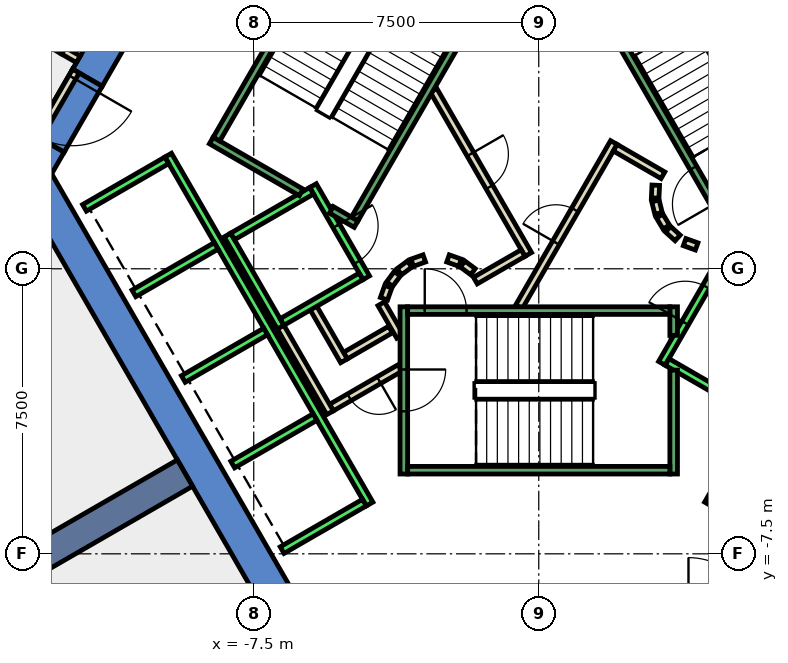
"""IFC4 building model, lengths in metres.
Left out: names, types, materials, properties, quantities, classifications, styles, units other than length and angle.
Written with IfcOpenShell. Run it as: python <this file> out.ifc"""

import sys

from ifc_helpers import new_model, si_unit, direction, frame, frame_2d, origin, place, context, subcontext, project, spatial, polyline, rectangle, outline, extrude, element, fill, save


model = new_model("IFC4")
c1 = context("Model", 3, precision=1e-05, world=origin(), true_north=direction((0.0, 1.0)))
c2 = subcontext(c1, "Body", "Model", "MODEL_VIEW")
j1 = project(units=[si_unit("LENGTHUNIT", "METRE"), si_unit("PLANEANGLEUNIT", "RADIAN")], contexts=[c1])
p1 = place(None, origin())
s1 = spatial("IfcSite", under=j1, at=p1, CompositionType="ELEMENT")
p2 = place(p1, origin())
s2 = spatial("IfcBuilding", under=s1, at=p2, CompositionType="ELEMENT")
p3 = place(p2, frame((0.0, 0.0, 120.2)))
s3 = spatial("IfcBuildingStorey", under=s2, at=p3, CompositionType="ELEMENT", Elevation=120.2)
p4 = place(p3, frame((0.0, 0.0, -0.4)))
e1 = element("IfcWall", 1, at=p4, inside=s3, PredefinedType="SHEAR", context=c2, shape_type="SweptSolid", body=[
    extrude(outline(polyline([(-12.267, 5.252), (-11.488, 4.802), (-6.409, 13.6), (-6.928, 14.5), (-12.267, 5.252)])), origin(), (0.0, 0.0, 1.0), 4.2),
])
p5 = place(p3, frame((0.0, 0.0, -0.4)))
e2 = element("IfcWall", 2, at=p5, inside=s3, PredefinedType="SHEAR", context=c2, shape_type="SweptSolid", body=[
    extrude(outline(polyline([(-12.488, 3.07), (-13.267, 3.52), (-13.856, 2.5), (-12.817, 2.5), (-12.488, 3.07)])), origin(), (0.0, 0.0, 1.0), 4.2),
])
p6 = place(p3, frame((0.0, 0.0, 3.6)))
e3 = element("IfcWall", 3, at=p6, inside=s3, PredefinedType="SHEAR", context=c2, shape_type="SweptSolid", body=[
    extrude(outline(polyline([(-13.267, 3.52), (-12.488, 3.07), (-11.488, 4.802), (-12.267, 5.252), (-13.267, 3.52)])), origin(), (0.0, 0.0, 1.0), 0.2),
])
p7 = place(p3, frame((0.0, 0.0, -0.4)))
e4 = element("IfcWall", 4, at=p7, inside=s3, PredefinedType="SHEAR", context=c2, shape_type="SweptSolid", body=[
    extrude(outline(polyline([(-13.856, 2.5), (-6.928, -9.5), (-6.409, -8.6), (-12.817, 2.5), (-13.856, 2.5)])), origin(), (0.0, 0.0, 1.0), 4.2),
])
p8 = place(p3, frame((-9.31, -5.375, -0.4), z_axis=(0.0, 0.0, 1.0), x_axis=(-0.866017533419, -0.500013631625, 0.0)))
e5 = element("IfcWall", 5, at=p8, inside=s3, PredefinedType="SHEAR", context=c2, shape_type="SweptSolid", body=[
    extrude(rectangle(XDim=9.0, YDim=0.8, at=frame_2d((4.5, 0.0))), origin(), (0.0, 0.0, 1.0), 4.2),
])
p9 = place(p3, frame((-15.532, 7.484, 0.0), z_axis=(0.0, 0.0, 1.0), x_axis=(0.866045954906, -0.499964402723, 0.0)))
e6 = element("IfcWall", 6, at=p9, inside=s3, PredefinedType="PARTITIONING", context=c2, shape_type="SweptSolid", body=[
    extrude(rectangle(XDim=3.494, YDim=0.2, at=frame_2d((1.747, 0.0))), origin(), (0.0, 0.0, 1.0), 3.8),
])
p10 = place(p3, frame((-3.9, -1.599, 0.0), z_axis=(0.0, 0.0, 1.0), x_axis=(-0.865969445389, -0.500096910261, 0.0)))
e7 = element("IfcWall", 7, at=p10, inside=s3, PredefinedType="PARTITIONING", context=c2, shape_type="SweptSolid", body=[
    extrude(rectangle(XDim=1.373, YDim=0.2, at=frame_2d((0.687, 0.0))), origin(), (0.0, 0.0, 1.0), 3.8),
])
p11 = place(p3, frame((-5.126, -2.422, 0.0), z_axis=(0.0, 0.0, 1.0), x_axis=(-0.500062241894, 0.865989465428, 0.0)))
e8 = element("IfcWall", 8, at=p11, inside=s3, PredefinedType="PARTITIONING", context=c2, shape_type="SweptSolid", body=[
    extrude(rectangle(XDim=1.7, YDim=0.2, at=frame_2d((0.85, 0.0))), origin(), (0.0, 0.0, 1.0), 3.8),
])
p12 = place(p3, frame((-3.65, -2.61, 0.0), z_axis=(0.0, 0.0, 1.0), x_axis=(-0.866072462134, -0.499918483688, 0.0)))
e9 = element("IfcWall", 9, at=p12, inside=s3, PredefinedType="PARTITIONING", context=c2, shape_type="SweptSolid", body=[
    extrude(rectangle(XDim=2.084, YDim=0.2, at=frame_2d((1.042, 0.0))), origin(), (0.0, 0.0, 1.0), 3.8),
])
p13 = place(p12, frame((0.642, 0.0, 0.0)))
e10 = element("IfcOpeningElement", 10, at=p13, cuts=e9, PredefinedType="OPENING", context=c2, shape_type="SweptSolid", body=[
    extrude(rectangle(XDim=0.9, YDim=2.1, at=frame_2d((0.45, 1.05))), frame((0.0, 0.11, 0.0), z_axis=(0.0, -1.0, 0.0), x_axis=(1.0, 0.0, 0.0)), (0.0, 0.0, 1.0), 0.22),
])
p14 = place(p3, frame((-5.492, -3.788, 0.0), z_axis=(0.0, 0.0, 1.0), x_axis=(-0.500008949224, 0.866020236886, 0.0)))
e11 = element("IfcWall", 11, at=p14, inside=s3, PredefinedType="PARTITIONING", context=c2, shape_type="SweptSolid", body=[
    extrude(rectangle(XDim=2.68, YDim=0.2, at=frame_2d((1.34, 0.0))), origin(), (0.0, 0.0, 1.0), 3.8),
])
p15 = place(p3, frame((-4.145, -0.92, 0.0), z_axis=(0.0, 0.0, 1.0), x_axis=(0.499743786207, -0.866173278362, 0.0)))
e12 = element("IfcWall", 12, at=p15, inside=s3, PredefinedType="PARTITIONING", context=c2, shape_type="SweptSolid", body=[
    extrude(rectangle(XDim=0.991, YDim=0.2, at=frame_2d((0.495, 0.0))), origin(), (0.0, 0.0, 1.0), 3.8),
])
p16 = place(p3, frame((-0.52, -1.0, 0.0), z_axis=(0.0, 0.0, 1.0), x_axis=(0.50011622646, 0.865958290007, 0.0)))
e13 = element("IfcWall", 13, at=p16, inside=s3, PredefinedType="PARTITIONING", context=c2, shape_type="SweptSolid", body=[
    extrude(rectangle(XDim=4.991, YDim=0.2, at=frame_2d((2.496, 0.0))), origin(), (0.0, 0.0, 1.0), 3.8),
])
p17 = place(p16, frame((1.945, 0.0, 0.0)))
e14 = element("IfcOpeningElement", 14, at=p17, cuts=e13, PredefinedType="OPENING", context=c2, shape_type="SweptSolid", body=[
    extrude(rectangle(XDim=1.0, YDim=2.1, at=frame_2d((0.5, 1.05))), frame((0.0, 0.11, 0.0), z_axis=(0.0, -1.0, 0.0), x_axis=(1.0, 0.0, 0.0)), (0.0, 0.0, 1.0), 0.22),
])
p18 = place(p3, frame((2.012, 3.186, 0.0), z_axis=(0.0, 0.0, 1.0), x_axis=(0.865891012941, -0.500232699559, 0.0)))
e15 = element("IfcWall", 15, at=p18, inside=s3, PredefinedType="PARTITIONING", context=c2, shape_type="SweptSolid", body=[
    extrude(rectangle(XDim=1.449, YDim=0.2, at=frame_2d((0.725, 0.0))), origin(), (0.0, 0.0, 1.0), 3.8),
])
p19 = place(p3, frame((3.079, 2.199, 0.0), z_axis=(0.0, 0.0, 1.0), x_axis=(-0.047771483479, -0.998858290933, 0.0)))
e16 = element("IfcWall", 16, at=p19, inside=s3, PredefinedType="PARTITIONING", context=c2, shape_type="SweptSolid", body=[
    extrude(rectangle(XDim=0.337, YDim=0.2, at=frame_2d((0.169, 0.0))), origin(), (0.0, 0.0, 1.0), 3.8),
])
p20 = place(p3, frame((3.07, 1.786, 0.0), z_axis=(0.0, 0.0, 1.0), x_axis=(0.242705583207, -0.970099994784, 0.0)))
e17 = element("IfcWall", 17, at=p20, inside=s3, PredefinedType="PARTITIONING", context=c2, shape_type="SweptSolid", body=[
    extrude(rectangle(XDim=0.338, YDim=0.2, at=frame_2d((0.169, 0.0))), origin(), (0.0, 0.0, 1.0), 3.8),
])
for number, where, z_axis, x_axis in (
    (18, (3.182, 1.388, 0.0), (0.0, 0.0, 1.0), (0.512, -0.859, 0.0)),
    (19, (3.404, 1.039, 0.0), (0.0, 0.0, 1.0), (0.74, -0.672, 0.0)),
):
    element("IfcWall", number, at=place(p3, frame(where, z_axis=z_axis, x_axis=x_axis)), inside=s3, PredefinedType="PARTITIONING", context=c2, shape_type="SweptSolid", body=[
        extrude(rectangle(XDim=0.338, YDim=0.2, at=frame_2d((0.169, 0.0))), origin(), (0.0, 0.0, 1.0), 3.8),
    ])
p21 = place(p3, frame((3.838, 0.702, 0.0), z_axis=(0.0, 0.0, 1.0), x_axis=(0.941035081519, -0.338308993895, 0.0)))
e20 = element("IfcWall", 20, at=p21, inside=s3, PredefinedType="PARTITIONING", context=c2, shape_type="SweptSolid", body=[
    extrude(rectangle(XDim=0.337, YDim=0.2, at=frame_2d((0.168, 0.0))), origin(), (0.0, 0.0, 1.0), 3.8),
])
p22 = place(p3, frame((-2.771, 4.7, 0.0), z_axis=(0.0, 0.0, 1.0), x_axis=(0.499969479948, -0.866043023828, 0.0)))
e21 = element("IfcWall", 21, at=p22, inside=s3, PredefinedType="PARTITIONING", context=c2, shape_type="SweptSolid", body=[
    extrude(rectangle(XDim=4.99, YDim=0.2, at=frame_2d((2.495, 0.0))), origin(), (0.0, 0.0, 1.0), 3.8),
])
p23 = place(p22, frame((1.945, 0.0, 0.0)))
e22 = element("IfcOpeningElement", 22, at=p23, cuts=e21, PredefinedType="OPENING", context=c2, shape_type="SweptSolid", body=[
    extrude(rectangle(XDim=1.0, YDim=2.1, at=frame_2d((0.5, 1.05))), frame((0.0, 0.11, 0.0), z_axis=(0.0, -1.0, 0.0), x_axis=(1.0, 0.0, 0.0)), (0.0, 0.0, 1.0), 0.22),
])
p24 = place(p3, frame((-0.412, 0.414, 0.0), z_axis=(0.0, 0.0, 1.0), x_axis=(-0.866017369001, -0.500013916395, 0.0)))
e23 = element("IfcWall", 23, at=p24, inside=s3, PredefinedType="PARTITIONING", context=c2, shape_type="SweptSolid", body=[
    extrude(rectangle(XDim=1.45, YDim=0.2, at=frame_2d((0.725, 0.0))), origin(), (0.0, 0.0, 1.0), 3.8),
])
p25 = place(p3, frame((-1.731, -0.077, 0.0), z_axis=(0.0, 0.0, 1.0), x_axis=(-0.804311165252, 0.594208338422, 0.0)))
e24 = element("IfcWall", 24, at=p25, inside=s3, PredefinedType="PARTITIONING", context=c2, shape_type="SweptSolid", body=[
    extrude(rectangle(XDim=0.338, YDim=0.2, at=frame_2d((0.169, 0.0))), origin(), (0.0, 0.0, 1.0), 3.8),
])
p26 = place(p3, frame((-2.07, 0.16, 0.0), z_axis=(0.0, 0.0, 1.0), x_axis=(-0.942199461132, 0.335052496547, 0.0)))
e25 = element("IfcWall", 25, at=p26, inside=s3, PredefinedType="PARTITIONING", context=c2, shape_type="SweptSolid", body=[
    extrude(rectangle(XDim=0.337, YDim=0.2, at=frame_2d((0.169, 0.0))), origin(), (0.0, 0.0, 1.0), 3.8),
])
p27 = place(p3, frame((-3.012, 0.273, 0.0), z_axis=(0.0, 0.0, 1.0), x_axis=(-0.942280615813, -0.334824194261, 0.0)))
e26 = element("IfcWall", 26, at=p27, inside=s3, PredefinedType="PARTITIONING", context=c2, shape_type="SweptSolid", body=[
    extrude(rectangle(XDim=0.338, YDim=0.2, at=frame_2d((0.169, 0.0))), origin(), (0.0, 0.0, 1.0), 3.8),
])
p28 = place(p3, frame((-3.397, 0.124, 0.0), z_axis=(0.0, 0.0, 1.0), x_axis=(-0.804311165252, -0.594208338422, 0.0)))
e27 = element("IfcWall", 27, at=p28, inside=s3, PredefinedType="PARTITIONING", context=c2, shape_type="SweptSolid", body=[
    extrude(rectangle(XDim=0.338, YDim=0.2, at=frame_2d((0.169, 0.0))), origin(), (0.0, 0.0, 1.0), 3.8),
])
p29 = place(p3, frame((-3.723, -0.131, 0.0), z_axis=(0.0, 0.0, 1.0), x_axis=(-0.594675113454, -0.803966112121, 0.0)))
e28 = element("IfcWall", 28, at=p29, inside=s3, PredefinedType="PARTITIONING", context=c2, shape_type="SweptSolid", body=[
    extrude(rectangle(XDim=0.338, YDim=0.2, at=frame_2d((0.169, 0.0))), origin(), (0.0, 0.0, 1.0), 3.8),
])
p30 = place(p3, frame((-3.96, -0.47, 0.0), z_axis=(0.0, 0.0, 1.0), x_axis=(-0.334824194261, -0.942280615813, 0.0)))
e29 = element("IfcWall", 29, at=p30, inside=s3, PredefinedType="PARTITIONING", context=c2, shape_type="SweptSolid", body=[
    extrude(rectangle(XDim=0.338, YDim=0.2, at=frame_2d((0.169, 0.0))), origin(), (0.0, 0.0, 1.0), 3.8),
])
p31 = place(p3, frame((-12.18, 5.202, 0.0), z_axis=(0.0, 0.0, 1.0), x_axis=(-0.50002537861, -0.866010750942, 0.0)))
e30 = element("IfcWall", 30, at=p31, inside=s3, PredefinedType="PARTITIONING", context=c2, shape_type="SweptSolid", body=[
    extrude(rectangle(XDim=2.0, YDim=0.2, at=frame_2d((1.0, 0.0))), origin(), (0.0, 0.0, 1.0), 2.4),
])
p32 = place(p31, frame((0.19, 0.0, 0.0)))
e31 = element("IfcOpeningElement", 31, at=p32, cuts=e30, PredefinedType="OPENING", context=c2, shape_type="SweptSolid", body=[
    extrude(rectangle(XDim=1.8, YDim=2.1, at=frame_2d((0.9, 1.05))), frame((0.0, 0.11, 0.0), z_axis=(0.0, -1.0, 0.0), x_axis=(1.0, 0.0, 0.0)), (0.0, 0.0, 1.0), 0.22),
])
p33 = place(p3, frame((-12.506, 5.737, 0.0), z_axis=(0.0, 0.0, 1.0), x_axis=(0.865624510465, -0.500693725627, 0.0)))
e32 = element("IfcWall", 32, at=p33, inside=s3, PredefinedType="PARTITIONING", context=c2, shape_type="SweptSolid", body=[
    extrude(rectangle(XDim=0.449, YDim=0.2, at=frame_2d((0.225, 0.0))), origin(), (0.0, 0.0, 1.0), 2.4),
])
p34 = place(p3, frame((-5.94, 2.188, 0.0), z_axis=(0.0, 0.0, 1.0), x_axis=(0.49994636267, -0.866056369097, 0.0)))
e33 = element("IfcWall", 33, at=p34, inside=s3, PredefinedType="STANDARD", context=c2, shape_type="SweptSolid", body=[
    extrude(rectangle(XDim=2.8, YDim=0.2, at=frame_2d((1.4, 0.0))), origin(), (0.0, 0.0, 1.0), 3.8),
])
p35 = place(p34, frame((1.225, 0.0, 0.0)))
e34 = element("IfcOpeningElement", 34, at=p35, cuts=e33, PredefinedType="OPENING", context=c2, shape_type="SweptSolid", body=[
    extrude(rectangle(XDim=1.1, YDim=2.1, at=frame_2d((0.55, 1.05))), frame((0.0, 0.11, 0.0), z_axis=(0.0, -1.0, 0.0), x_axis=(1.0, 0.0, 0.0)), (0.0, 0.0, 1.0), 0.22),
])
p36 = place(p3, frame((-8.192, 0.888, 0.0), z_axis=(0.0, 0.0, 1.0), x_axis=(0.49994636267, -0.866056369097, 0.0)))
e35 = element("IfcWall", 35, at=p36, inside=s3, PredefinedType="STANDARD", context=c2, shape_type="SweptSolid", body=[
    extrude(rectangle(XDim=2.8, YDim=0.2, at=frame_2d((1.4, 0.0))), origin(), (0.0, 0.0, 1.0), 3.8),
])
for number, where, z_axis, x_axis in (
    (36, (-5.977, 2.052, 0.0), (0.0, 0.0, 1.0), (-0.866, -0.5, 0.0)),
    (37, (-4.677, -0.2, 0.0), (0.0, 0.0, 1.0), (-0.866, -0.5, 0.0)),
):
    element("IfcWall", number, at=place(p3, frame(where, z_axis=z_axis, x_axis=x_axis)), inside=s3, PredefinedType="STANDARD", context=c2, shape_type="SweptSolid", body=[
        extrude(rectangle(XDim=2.399, YDim=0.2, at=frame_2d((1.2, 0.0))), origin(), (0.0, 0.0, 1.0), 3.8),
    ])
p37 = place(p3, frame((-9.751, 2.99, 0.0), z_axis=(0.0, 0.0, 1.0), x_axis=(0.50000090737, -0.866024879913, 0.0)))
e38 = element("IfcWall", 38, at=p37, inside=s3, PredefinedType="STANDARD", context=c2, shape_type="SweptSolid", body=[
    extrude(rectangle(XDim=10.6, YDim=0.2, at=frame_2d((5.3, 0.0))), origin(), (0.0, 0.0, 1.0), 3.8),
])
p38 = place(p3, frame((-9.788, 2.853, 0.0), z_axis=(0.0, 0.0, 1.0), x_axis=(-0.865998541277, -0.500046524342, 0.0)))
e39 = element("IfcWall", 39, at=p38, inside=s3, PredefinedType="STANDARD", context=c2, shape_type="SweptSolid", body=[
    extrude(rectangle(XDim=2.5, YDim=0.2, at=frame_2d((1.25, 0.0))), origin(), (0.0, 0.0, 1.0), 3.8),
])
for number, where, z_axis, x_axis in (
    (40, (-8.488, 0.602, 0.0), (0.0, 0.0, 1.0), (-0.866, -0.5, 0.0)),
    (41, (-7.188, -1.65, 0.0), (0.0, 0.0, 1.0), (-0.866, -0.5, 0.0)),
    (42, (-5.888, -3.902, 0.0), (0.0, 0.0, 1.0), (-0.866, -0.5, 0.0)),
    (43, (-4.588, -6.153, 0.0), (0.0, 0.0, 1.0), (-0.866, -0.5, 0.0)),
):
    element("IfcWall", number, at=place(p3, frame(where, z_axis=z_axis, x_axis=x_axis)), inside=s3, PredefinedType="STANDARD", context=c2, shape_type="SweptSolid", body=[
        extrude(rectangle(XDim=2.5, YDim=0.2, at=frame_2d((1.25, 0.0))), origin(), (0.0, 0.0, 1.0), 3.8),
    ])
p39 = place(p3, frame((3.24, -2.488, 0.0), z_axis=(0.0, 0.0, 1.0), x_axis=(0.49994636267, 0.866056369097, 0.0)))
e44 = element("IfcWall", 44, at=p39, inside=s3, PredefinedType="STANDARD", context=c2, shape_type="SweptSolid", body=[
    extrude(rectangle(XDim=2.8, YDim=0.2, at=frame_2d((1.4, 0.0))), origin(), (0.0, 0.0, 1.0), 3.8),
])
p40 = place(p39, frame((1.225, 0.0, 0.0)))
e45 = element("IfcOpeningElement", 45, at=p40, cuts=e44, PredefinedType="OPENING", context=c2, shape_type="SweptSolid", body=[
    extrude(rectangle(XDim=1.1, YDim=2.1, at=frame_2d((0.55, 1.05))), frame((0.0, 0.11, 0.0), z_axis=(0.0, -1.0, 0.0), x_axis=(1.0, 0.0, 0.0)), (0.0, 0.0, 1.0), 0.22),
])
p41 = place(p3, frame((3.377, -2.452, 0.0), z_axis=(0.0, 0.0, 1.0), x_axis=(0.865955154139, -0.50012165622, 0.0)))
e46 = element("IfcWall", 46, at=p41, inside=s3, PredefinedType="STANDARD", context=c2, shape_type="SweptSolid", body=[
    extrude(rectangle(XDim=2.4, YDim=0.2, at=frame_2d((1.2, 0.0))), origin(), (0.0, 0.0, 1.0), 3.8),
])
p42 = place(p3, frame((4.451, -6.19, 0.0), z_axis=(0.0, 0.0, 1.0), x_axis=(0.50000090737, 0.866024879913, 0.0)))
e47 = element("IfcWall", 47, at=p42, inside=s3, PredefinedType="STANDARD", context=c2, shape_type="SweptSolid", body=[
    extrude(rectangle(XDim=10.6, YDim=0.2, at=frame_2d((5.3, 0.0))), origin(), (0.0, 0.0, 1.0), 3.8),
])
p43 = place(p3, frame((-3.55, -1.0, 0.0), z_axis=(0.0, 0.0, 1.0), x_axis=(0.0, -1.0, 0.0)))
e48 = element("IfcWall", 48, at=p43, inside=s3, PredefinedType="STANDARD", context=c2, shape_type="SweptSolid", body=[
    extrude(rectangle(XDim=4.4, YDim=0.2, at=frame_2d((2.2, 0.0))), origin(), (0.0, 0.0, 1.0), 3.8),
])
p44 = place(p43, frame((1.65, 0.0, 0.0)))
e49 = element("IfcOpeningElement", 49, at=p44, cuts=e48, PredefinedType="OPENING", context=c2, shape_type="SweptSolid", body=[
    extrude(rectangle(XDim=1.1, YDim=2.2, at=frame_2d((0.55, 1.1))), frame((0.0, 0.11, 0.0), z_axis=(0.0, -1.0, 0.0), x_axis=(1.0, 0.0, 0.0)), (0.0, 0.0, 1.0), 0.22),
])
p45 = place(p3, frame((3.55, -2.667, 0.0), z_axis=(0.0, 0.0, 1.0), x_axis=(0.0, -1.0, 0.0)))
e50 = element("IfcWall", 50, at=p45, inside=s3, PredefinedType="STANDARD", context=c2, shape_type="SweptSolid", body=[
    extrude(rectangle(XDim=2.733, YDim=0.2, at=frame_2d((1.366, 0.0))), origin(), (0.0, 0.0, 1.0), 3.8),
])
p46 = place(p3, frame((3.55, -1.0, 0.0), z_axis=(0.0, 0.0, 1.0), x_axis=(0.0, -1.0, 0.0)))
e51 = element("IfcWall", 51, at=p46, inside=s3, PredefinedType="STANDARD", context=c2, shape_type="SweptSolid", body=[
    extrude(rectangle(XDim=0.751, YDim=0.2, at=frame_2d((0.375, 0.0))), origin(), (0.0, 0.0, 1.0), 3.8),
])
p47 = place(p3, frame((-3.45, -1.1, 0.0), z_axis=(0.0, 0.0, 1.0), x_axis=(1.0, 0.0, 0.0)))
e52 = element("IfcWall", 52, at=p47, inside=s3, PredefinedType="STANDARD", context=c2, shape_type="SweptSolid", body=[
    extrude(rectangle(XDim=6.9, YDim=0.2, at=frame_2d((3.45, 0.0))), origin(), (0.0, 0.0, 1.0), 3.8),
])
p48 = place(p47, frame((0.45, 0.0, 0.0)))
e53 = element("IfcOpeningElement", 53, at=p48, cuts=e52, PredefinedType="OPENING", context=c2, shape_type="SweptSolid", body=[
    extrude(rectangle(XDim=1.1, YDim=2.2, at=frame_2d((0.55, 1.1))), frame((0.0, 0.11, 0.0), z_axis=(0.0, -1.0, 0.0), x_axis=(1.0, 0.0, 0.0)), (0.0, 0.0, 1.0), 0.22),
])
p49 = place(p3, frame((-3.45, -5.3, 0.0), z_axis=(0.0, 0.0, 1.0), x_axis=(1.0, 0.0, 0.0)))
e54 = element("IfcWall", 54, at=p49, inside=s3, PredefinedType="STANDARD", context=c2, shape_type="SweptSolid", body=[
    extrude(rectangle(XDim=6.9, YDim=0.2, at=frame_2d((3.45, 0.0))), origin(), (0.0, 0.0, 1.0), 3.8),
])
p50 = place(p3, frame((4.843, 1.312, 0.0), z_axis=(0.0, 0.0, 1.0), x_axis=(-0.499963383562, 0.866046543262, 0.0)))
e55 = element("IfcWall", 55, at=p50, inside=s3, PredefinedType="STANDARD", context=c2, shape_type="SweptSolid", body=[
    extrude(rectangle(XDim=6.9, YDim=0.2, at=frame_2d((3.45, 0.0))), origin(), (0.0, 0.0, 1.0), 3.8),
])
p51 = place(p50, frame((0.45, 0.0, 0.0)))
e56 = element("IfcOpeningElement", 56, at=p51, cuts=e55, PredefinedType="OPENING", context=c2, shape_type="SweptSolid", body=[
    extrude(rectangle(XDim=1.1, YDim=2.2, at=frame_2d((0.55, 1.1))), frame((0.0, 0.11, 0.0), z_axis=(0.0, -1.0, 0.0), x_axis=(1.0, 0.0, 0.0)), (0.0, 0.0, 1.0), 0.22),
])
p52 = place(p3, frame((-6.25, 2.01, 0.0), z_axis=(0.0, 0.0, 1.0), x_axis=(-0.86611865017, 0.499838457731, 0.0)))
e57 = element("IfcWall", 57, at=p52, inside=s3, PredefinedType="STANDARD", context=c2, shape_type="SweptSolid", body=[
    extrude(rectangle(XDim=2.733, YDim=0.2, at=frame_2d((1.366, 0.0))), origin(), (0.0, 0.0, 1.0), 3.8),
])
p53 = place(p3, frame((-4.806, 1.176, 0.0), z_axis=(0.0, 0.0, 1.0), x_axis=(-0.866558586415, 0.499075361355, 0.0)))
e58 = element("IfcWall", 58, at=p53, inside=s3, PredefinedType="STANDARD", context=c2, shape_type="SweptSolid", body=[
    extrude(rectangle(XDim=0.751, YDim=0.2, at=frame_2d((0.376, 0.0))), origin(), (0.0, 0.0, 1.0), 3.8),
])
p54 = place(p3, frame((-1.393, 7.288, 0.0), z_axis=(0.0, 0.0, 1.0), x_axis=(-0.499963383562, -0.866046543262, 0.0)))
e59 = element("IfcWall", 59, at=p54, inside=s3, PredefinedType="STANDARD", context=c2, shape_type="SweptSolid", body=[
    extrude(rectangle(XDim=6.9, YDim=0.2, at=frame_2d((3.45, 0.0))), origin(), (0.0, 0.0, 1.0), 3.8),
])
p55 = place(p54, frame((0.45, 0.0, 0.0)))
e60 = element("IfcOpeningElement", 60, at=p55, cuts=e59, PredefinedType="OPENING", context=c2, shape_type="SweptSolid", body=[
    extrude(rectangle(XDim=1.1, YDim=2.2, at=frame_2d((0.55, 1.1))), frame((0.0, 0.11, 0.0), z_axis=(0.0, -1.0, 0.0), x_axis=(1.0, 0.0, 0.0)), (0.0, 0.0, 1.0), 0.22),
])
p56 = place(p3, frame((-5.03, 9.388, 0.0), z_axis=(0.0, 0.0, 1.0), x_axis=(-0.499978703459, -0.866037698999, 0.0)))
e61 = element("IfcWall", 61, at=p56, inside=s3, PredefinedType="STANDARD", context=c2, shape_type="SweptSolid", body=[
    extrude(rectangle(XDim=6.9, YDim=0.2, at=frame_2d((3.45, 0.0))), origin(), (0.0, 0.0, 1.0), 3.8),
])
p57 = place(p17, origin())
e62 = element("IfcDoor", 62, at=p57, inside=s3, OperationType="SINGLE_SWING_LEFT", PredefinedType="DOOR", context=c2, shape_type="SweptSolid", body=[
    extrude(rectangle(XDim=1.0, YDim=2.1, at=frame_2d((0.5, 1.05))), frame((0.0, 0.025, 0.0), z_axis=(0.0, -1.0, 0.0), x_axis=(1.0, 0.0, 0.0)), (0.0, 0.0, 1.0), 0.05),
])
fill(e14, e62)
p58 = place(p23, origin())
e63 = element("IfcDoor", 63, at=p58, inside=s3, OperationType="SINGLE_SWING_RIGHT", PredefinedType="DOOR", context=c2, shape_type="SweptSolid", body=[
    extrude(rectangle(XDim=1.0, YDim=2.1, at=frame_2d((0.5, 1.05))), frame((0.0, 0.025, 0.0), z_axis=(0.0, -1.0, 0.0), x_axis=(1.0, 0.0, 0.0)), (0.0, 0.0, 1.0), 0.05),
])
fill(e22, e63)
p59 = place(p13, origin())
e64 = element("IfcDoor", 64, at=p59, inside=s3, OperationType="SINGLE_SWING_LEFT", PredefinedType="DOOR", context=c2, shape_type="SweptSolid", body=[
    extrude(rectangle(XDim=0.9, YDim=2.1, at=frame_2d((0.45, 1.05))), frame((0.0, 0.025, 0.0), z_axis=(0.0, -1.0, 0.0), x_axis=(1.0, 0.0, 0.0)), (0.0, 0.0, 1.0), 0.05),
])
fill(e10, e64)
p60 = place(p32, origin())
e65 = element("IfcDoor", 65, at=p60, inside=s3, OperationType="DOUBLE_DOOR_SINGLE_SWING", PredefinedType="DOOR", context=c2, shape_type="SweptSolid", body=[
    extrude(rectangle(XDim=1.8, YDim=2.1, at=frame_2d((0.9, 1.05))), frame((0.0, 0.025, 0.0), z_axis=(0.0, -1.0, 0.0), x_axis=(1.0, 0.0, 0.0)), (0.0, 0.0, 1.0), 0.05),
])
fill(e31, e65)
p61 = place(p40, origin())
e66 = element("IfcDoor", 66, at=p61, inside=s3, OperationType="SLIDING_TO_LEFT", PredefinedType="DOOR", context=c2, shape_type="SweptSolid", body=[
    extrude(rectangle(XDim=1.1, YDim=2.1, at=frame_2d((0.55, 1.05))), frame((0.0, 0.025, 0.0), z_axis=(0.0, -1.0, 0.0), x_axis=(1.0, 0.0, 0.0)), (0.0, 0.0, 1.0), 0.05),
])
fill(e45, e66)
p62 = place(p35, origin())
e67 = element("IfcDoor", 67, at=p62, inside=s3, OperationType="SLIDING_TO_LEFT", PredefinedType="DOOR", context=c2, shape_type="SweptSolid", body=[
    extrude(rectangle(XDim=1.1, YDim=2.1, at=frame_2d((0.55, 1.05))), frame((0.0, 0.025, 0.0), z_axis=(0.0, -1.0, 0.0), x_axis=(1.0, 0.0, 0.0)), (0.0, 0.0, 1.0), 0.05),
])
fill(e34, e67)
p63 = place(p48, origin())
e68 = element("IfcDoor", 68, at=p63, inside=s3, OperationType="SINGLE_SWING_LEFT", PredefinedType="DOOR", context=c2, shape_type="SweptSolid", body=[
    extrude(rectangle(XDim=1.1, YDim=2.2, at=frame_2d((0.55, 1.1))), frame((0.0, 0.025, 0.0), z_axis=(0.0, -1.0, 0.0), x_axis=(1.0, 0.0, 0.0)), (0.0, 0.0, 1.0), 0.05),
])
fill(e53, e68)
p64 = place(p44, origin())
e69 = element("IfcDoor", 69, at=p64, inside=s3, OperationType="SINGLE_SWING_LEFT", PredefinedType="DOOR", context=c2, shape_type="SweptSolid", body=[
    extrude(rectangle(XDim=1.1, YDim=2.2, at=frame_2d((0.55, 1.1))), frame((0.0, 0.025, 0.0), z_axis=(0.0, -1.0, 0.0), x_axis=(1.0, 0.0, 0.0)), (0.0, 0.0, 1.0), 0.05),
])
fill(e49, e69)
p65 = place(p51, origin())
e70 = element("IfcDoor", 70, at=p65, inside=s3, OperationType="SINGLE_SWING_LEFT", PredefinedType="DOOR", context=c2, shape_type="SweptSolid", body=[
    extrude(rectangle(XDim=1.1, YDim=2.2, at=frame_2d((0.55, 1.1))), frame((0.0, 0.025, 0.0), z_axis=(0.0, -1.0, 0.0), x_axis=(1.0, 0.0, 0.0)), (0.0, 0.0, 1.0), 0.05),
])
fill(e56, e70)
save(model, sys.argv[1])
